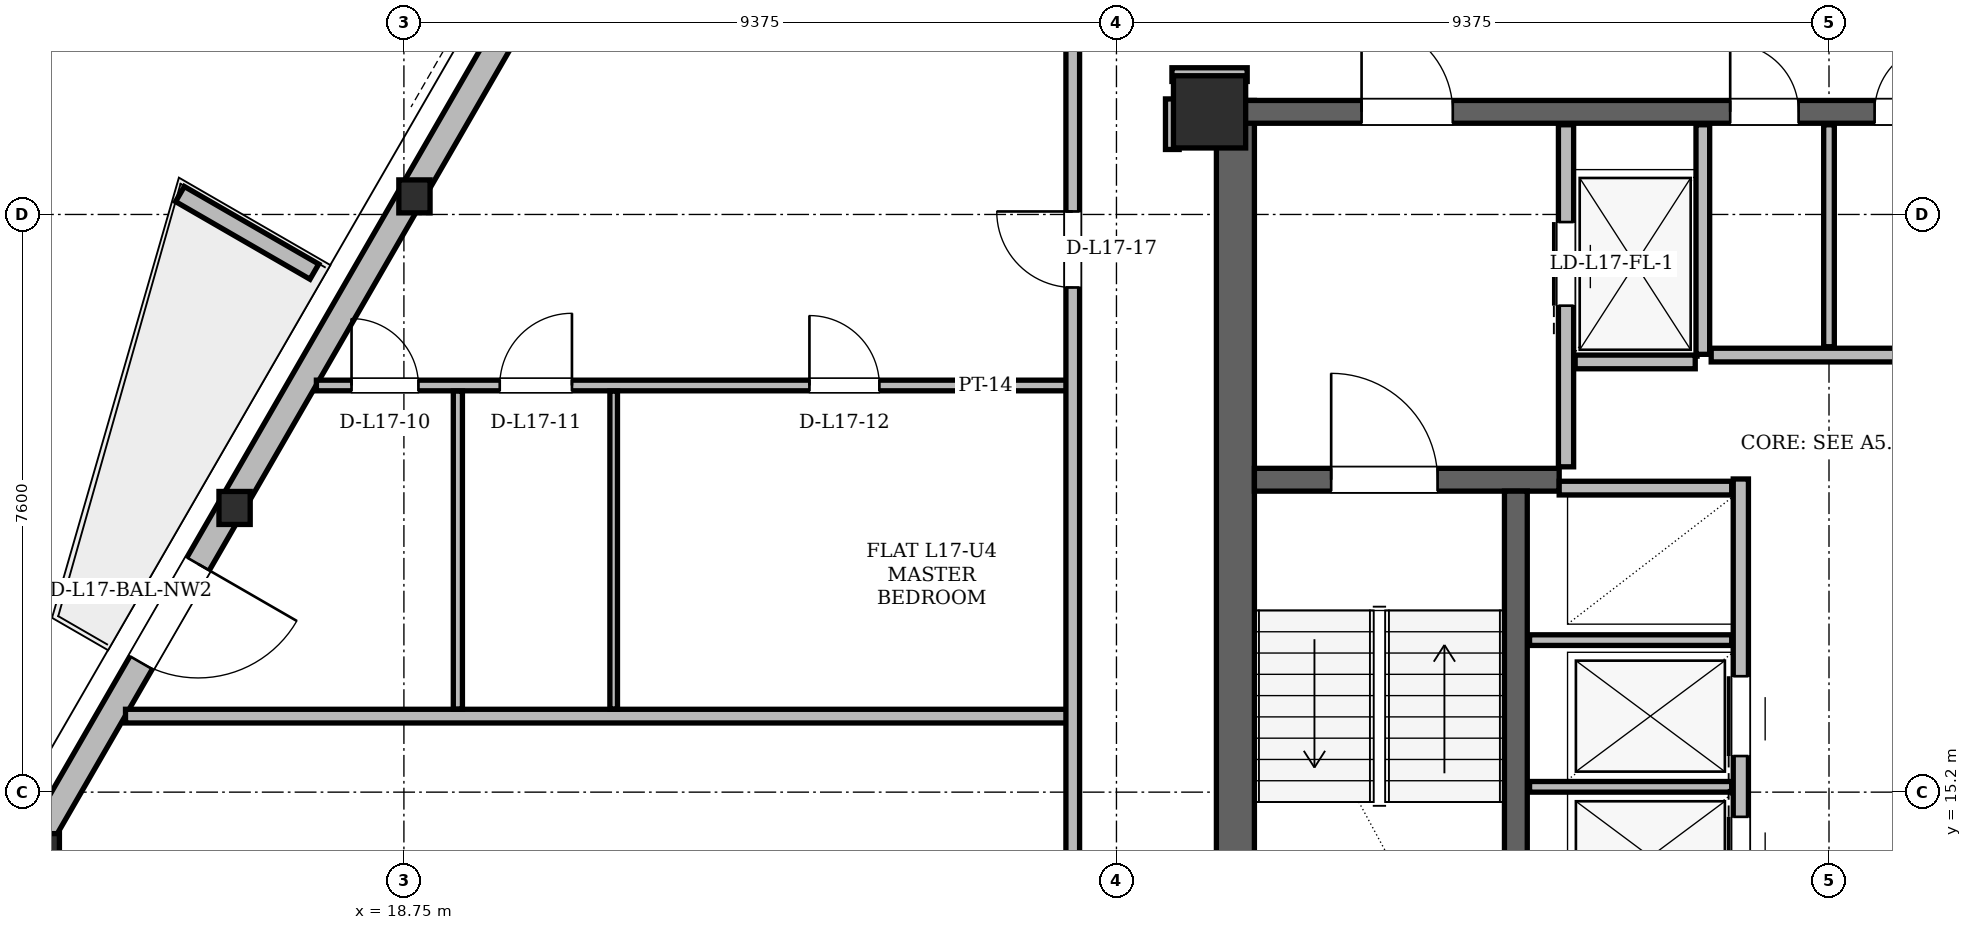
"""IFC4 building model, lengths in metres.
Left out: names, types, materials, properties, quantities, classifications, styles, units other than length and angle.
Written with IfcOpenShell. Run it as: python <this file> out.ifc"""

import sys

from ifc_helpers import new_model, si_unit, direction, frame, frame_2d, origin, origin_2d, place, context, subcontext, project, spatial, polyline, rectangle, hollow_rectangle, i_section, outline, extrude, element, fill, save


model = new_model("IFC4")
c1 = context("Model", 3, precision=1e-05, world=origin(), true_north=direction((0.0, 1.0)))
c2 = subcontext(c1, "Body", "Model", "MODEL_VIEW")
j1 = project(units=[si_unit("LENGTHUNIT", "METRE"), si_unit("PLANEANGLEUNIT", "RADIAN")], contexts=[c1])
p1 = place(None, origin())
s1 = spatial("IfcSite", under=j1, at=p1, CompositionType="ELEMENT")
p2 = place(p1, origin())
s2 = spatial("IfcBuilding", under=s1, at=p2, CompositionType="ELEMENT")
p3 = place(p2, frame((0.0, 0.0, 66.9)))
s3 = spatial("IfcBuildingStorey", under=s2, at=p3, CompositionType="ELEMENT", Elevation=66.9)
p4 = place(p3, frame((29.35, 24.15, 0.0), z_axis=(0.0, 0.0, 1.0), x_axis=(1.0, 0.0, 0.0)))
e1 = element("IfcColumn", 1, at=p4, inside=s3, PredefinedType="COLUMN", context=c2, shape_type="SweptSolid", body=[
    extrude(hollow_rectangle(XDim=0.95, YDim=0.95, WallThickness=0.08, at=origin_2d()), origin(), (0.0, 0.0, 1.0), 3.6),
])
p5 = place(p3, frame((13.788, 14.297, 0.005), z_axis=(0.016717385231, -0.023784897687, 0.999577314505), x_axis=(0.818132254309, 0.575030098743, 0.0)))
e2 = element("IfcColumn", 2, at=p5, inside=s3, PredefinedType="COLUMN", context=c2, shape_type="SweptSolid", body=[
    extrude(hollow_rectangle(XDim=0.8, YDim=0.8, WallThickness=0.065, at=origin_2d()), origin(), (0.0, 0.0, 1.0), 3.593),
])
p6 = place(p3, frame((18.852, 23.069, 0.005), z_axis=(0.020388348906, -0.017398057733, 0.999640746877), x_axis=(0.649119270697, 0.760686645348, 0.0)))
e3 = element("IfcColumn", 3, at=p6, inside=s3, PredefinedType="COLUMN", context=c2, shape_type="SweptSolid", body=[
    extrude(i_section(OverallWidth=0.411, OverallDepth=0.434, WebThickness=0.036, FlangeThickness=0.057, at=origin_2d()), origin(), (0.0, 0.0, 1.0), 3.592),
])
p7 = place(p3, frame((16.489, 18.975, 0.005), z_axis=(0.018688884401, -0.020387873892, 0.999617456929), x_axis=(0.737154140201, 0.675724628517, 0.0)))
e4 = element("IfcColumn", 4, at=p7, inside=s3, PredefinedType="COLUMN", context=c2, shape_type="SweptSolid", body=[
    extrude(i_section(OverallWidth=0.411, OverallDepth=0.434, WebThickness=0.036, FlangeThickness=0.057, at=origin_2d()), origin(), (0.0, 0.0, 1.0), 3.593),
])
p8 = place(p3, frame((29.69, 11.0, 0.0), z_axis=(0.0, 0.0, 1.0), x_axis=(0.0, 1.0, 0.0)))
e5 = element("IfcWall", 5, at=p8, inside=s3, PredefinedType="SHEAR", context=c2, shape_type="SweptSolid", body=[
    extrude(rectangle(XDim=13.3, YDim=0.5, at=frame_2d((6.65, 0.0))), origin(), (0.0, 0.0, 1.0), 3.36),
])
p9 = place(p3, frame((29.65, 24.15, 0.0), z_axis=(0.0, 0.0, 1.0), x_axis=(1.0, 0.0, 0.0)))
e6 = element("IfcWall", 6, at=p9, inside=s3, PredefinedType="SHEAR", context=c2, shape_type="SweptSolid", body=[
    extrude(rectangle(XDim=15.7, YDim=0.3, at=frame_2d((7.85, 0.0))), origin(), (0.0, 0.0, 1.0), 3.36),
])
p10 = place(p9, frame((1.7, 0.0, 0.0)))
e7 = element("IfcOpeningElement", 7, at=p10, cuts=e6, PredefinedType="OPENING", context=c2, shape_type="SweptSolid", body=[
    extrude(rectangle(XDim=1.2, YDim=2.2, at=frame_2d((0.6, 1.1))), frame((0.0, 0.15, 0.0), z_axis=(0.0, -1.0, 0.0), x_axis=(1.0, 0.0, 0.0)), (0.0, 0.0, 1.0), 0.3),
])
p11 = place(p9, frame((12.8, 0.0, 0.0)))
e8 = element("IfcOpeningElement", 8, at=p11, cuts=e6, PredefinedType="OPENING", context=c2, shape_type="SweptSolid", body=[
    extrude(rectangle(XDim=1.2, YDim=2.2, at=frame_2d((0.6, 1.1))), frame((0.0, 0.15, 0.0), z_axis=(0.0, -1.0, 0.0), x_axis=(1.0, 0.0, 0.0)), (0.0, 0.0, 1.0), 0.3),
])
p12 = place(p9, frame((6.55, 0.0, 0.0)))
e9 = element("IfcOpeningElement", 9, at=p12, cuts=e6, PredefinedType="OPENING", context=c2, shape_type="SweptSolid", body=[
    extrude(rectangle(XDim=0.9, YDim=2.05, at=frame_2d((0.45, 1.025))), frame((0.0, 0.15, 0.0), z_axis=(0.0, -1.0, 0.0), x_axis=(1.0, 0.0, 0.0)), (0.0, 0.0, 1.0), 0.3),
])
p13 = place(p9, frame((8.45, 0.0, 0.0)))
e10 = element("IfcOpeningElement", 10, at=p13, cuts=e6, PredefinedType="OPENING", context=c2, shape_type="SweptSolid", body=[
    extrude(rectangle(XDim=0.9, YDim=2.05, at=frame_2d((0.45, 1.025))), frame((0.0, 0.15, 0.0), z_axis=(0.0, -1.0, 0.0), x_axis=(1.0, 0.0, 0.0)), (0.0, 0.0, 1.0), 0.3),
])
p14 = place(p3, frame((29.94, 19.31, 0.0), z_axis=(0.0, 0.0, 1.0), x_axis=(1.0, 0.0, 0.0)))
e11 = element("IfcWall", 11, at=p14, inside=s3, PredefinedType="SHEAR", context=c2, shape_type="SweptSolid", body=[
    extrude(rectangle(XDim=4.01, YDim=0.3, at=frame_2d((2.005, 0.0))), origin(), (0.0, 0.0, 1.0), 3.36),
])
p15 = place(p14, frame((1.01, 0.0, 0.0)))
e12 = element("IfcOpeningElement", 12, at=p15, cuts=e11, PredefinedType="OPENING", context=c2, shape_type="SweptSolid", body=[
    extrude(rectangle(XDim=1.4, YDim=2.2, at=frame_2d((0.7, 1.1))), frame((0.0, 0.15, 0.0), z_axis=(0.0, -1.0, 0.0), x_axis=(1.0, 0.0, 0.0)), (0.0, 0.0, 1.0), 0.3),
])
p16 = place(p3, frame((33.38, 11.54, 0.0), z_axis=(0.0, 0.0, 1.0), x_axis=(0.0, 1.0, 0.0)))
e13 = element("IfcWall", 13, at=p16, inside=s3, PredefinedType="SHEAR", context=c2, shape_type="SweptSolid", body=[
    extrude(rectangle(XDim=7.62, YDim=0.3, at=frame_2d((3.81, 0.0))), origin(), (0.0, 0.0, 1.0), 3.36),
])
p17 = place(p3, frame((30.669, 43.537, 0.0), z_axis=(0.0, 0.0, 1.0), x_axis=(-0.499997235847, -0.866026999663, 0.0)))
e14 = element("IfcWall", 14, at=p17, inside=s3, PredefinedType="SOLIDWALL", context=c2, shape_type="SweptSolid", body=[
    extrude(rectangle(XDim=33.763, YDim=0.34, at=frame_2d((16.882, 0.0))), origin(), (0.0, 0.0, 1.0), 2.494),
])
p18 = place(p17, frame((7.924, 0.0, 0.0)))
e15 = element("IfcOpeningElement", 15, at=p18, cuts=e14, PredefinedType="OPENING", context=c2, shape_type="SweptSolid", body=[
    extrude(rectangle(XDim=1.3, YDim=2.2, at=frame_2d((0.65, 1.1))), frame((0.0, 0.17, 0.0), z_axis=(0.0, -1.0, 0.0), x_axis=(1.0, 0.0, 0.0)), (0.0, 0.0, 1.0), 0.34),
])
p19 = place(p17, frame((29.254, 0.0, 0.0)))
e16 = element("IfcOpeningElement", 16, at=p19, cuts=e14, PredefinedType="OPENING", context=c2, shape_type="SweptSolid", body=[
    extrude(rectangle(XDim=1.5, YDim=2.2, at=frame_2d((0.75, 1.1))), frame((0.0, 0.17, 0.0), z_axis=(0.0, -1.0, 0.0), x_axis=(1.0, 0.0, 0.0)), (0.0, 0.0, 1.0), 0.34),
])
p20 = place(p17, frame((12.199, 0.0, 0.85)))
e17 = element("IfcOpeningElement", 17, at=p20, cuts=e14, PredefinedType="OPENING", context=c2, shape_type="SweptSolid", body=[
    extrude(rectangle(XDim=1.8, YDim=1.534, at=frame_2d((0.9, 0.767))), frame((0.0, 0.17, 0.0), z_axis=(0.0, -1.0, 0.0), x_axis=(1.0, 0.0, 0.0)), (0.0, 0.0, 1.0), 0.34),
])
p21 = place(p17, frame((19.181, 0.0, 0.85)))
e18 = element("IfcOpeningElement", 18, at=p21, cuts=e14, PredefinedType="OPENING", context=c2, shape_type="SweptSolid", body=[
    extrude(rectangle(XDim=1.2, YDim=1.48, at=frame_2d((0.6, 0.74))), frame((0.0, 0.17, 0.0), z_axis=(0.0, -1.0, 0.0), x_axis=(1.0, 0.0, 0.0)), (0.0, 0.0, 1.0), 0.34),
])
p22 = place(p17, frame((1.231, 0.0, 0.85)))
e19 = element("IfcOpeningElement", 19, at=p22, cuts=e14, PredefinedType="OPENING", context=c2, shape_type="SweptSolid", body=[
    extrude(rectangle(XDim=1.8, YDim=1.534, at=frame_2d((0.9, 0.767))), frame((0.0, 0.17, 0.0), z_axis=(0.0, -1.0, 0.0), x_axis=(1.0, 0.0, 0.0)), (0.0, 0.0, 1.0), 0.34),
])
p23 = place(p3, frame((17.572, 22.048, 0.0), z_axis=(0.0, 0.0, 1.0), x_axis=(-0.866012356593, 0.500022597718, 0.0)))
e20 = element("IfcWall", 20, at=p23, inside=s3, PredefinedType="PARAPET", context=c2, shape_type="SweptSolid", body=[
    extrude(outline(polyline([(0.0, 0.0), (2.042, 0.0), (2.042, 1.1), (0.0, 1.32), (0.0, 0.0)])), frame((0.0, 0.115, 0.0), z_axis=(0.0, -1.0, 0.0), x_axis=(1.0, 0.0, 0.0)), (0.0, 0.0, 1.0), 0.23),
])
p24 = place(p3, frame((34.04, 19.48, 0.0), z_axis=(0.0, 0.0, 1.0), x_axis=(0.0, 1.0, 0.0)))
e21 = element("IfcWall", 21, at=p24, inside=s3, PredefinedType="PARTITIONING", context=c2, shape_type="SweptSolid", body=[
    extrude(rectangle(XDim=4.5, YDim=0.2, at=frame_2d((2.25, 0.0))), origin(), (0.0, 0.0, 1.0), 2.4),
])
p25 = place(p24, frame((2.12, 0.0, 0.0)))
e22 = element("IfcOpeningElement", 22, at=p25, cuts=e21, PredefinedType="OPENING", context=c2, shape_type="SweptSolid", body=[
    extrude(rectangle(XDim=1.1, YDim=2.2, at=frame_2d((0.55, 1.1))), frame((0.0, 0.1, 0.0), z_axis=(0.0, -1.0, 0.0), x_axis=(1.0, 0.0, 0.0)), (0.0, 0.0, 1.0), 0.2),
])
p26 = place(p3, frame((35.84, 20.96, 0.0), z_axis=(0.0, 0.0, 1.0), x_axis=(0.0, 1.0, 0.0)))
e23 = element("IfcWall", 23, at=p26, inside=s3, PredefinedType="PARTITIONING", context=c2, shape_type="SweptSolid", body=[
    extrude(rectangle(XDim=3.02, YDim=0.18, at=frame_2d((1.51, 0.0))), origin(), (0.0, 0.0, 1.0), 2.4),
])
p27 = place(p3, frame((34.16, 20.86, 0.0), z_axis=(0.0, 0.0, 1.0), x_axis=(1.0, 0.0, 0.0)))
e24 = element("IfcWall", 24, at=p27, inside=s3, PredefinedType="PARTITIONING", context=c2, shape_type="SweptSolid", body=[
    extrude(rectangle(XDim=1.58, YDim=0.18, at=frame_2d((0.79, 0.0))), origin(), (0.0, 0.0, 1.0), 3.36),
])
p28 = place(p3, frame((36.34, 11.72, 0.0), z_axis=(0.0, 0.0, 1.0), x_axis=(0.0, 1.0, 0.0)))
e25 = element("IfcWall", 25, at=p28, inside=s3, PredefinedType="PARTITIONING", context=c2, shape_type="SweptSolid", body=[
    extrude(rectangle(XDim=7.6, YDim=0.2, at=frame_2d((3.8, 0.0))), origin(), (0.0, 0.0, 1.0), 3.36),
])
p29 = place(p28, frame((0.255, 0.0, 0.0)))
e26 = element("IfcOpeningElement", 26, at=p29, cuts=e25, PredefinedType="OPENING", context=c2, shape_type="SweptSolid", body=[
    extrude(rectangle(XDim=1.05, YDim=2.15, at=frame_2d((0.525, 1.075))), frame((0.0, 0.1, 0.0), z_axis=(0.0, -1.0, 0.0), x_axis=(1.0, 0.0, 0.0)), (0.0, 0.0, 1.0), 0.2),
])
p30 = place(p28, frame((2.105, 0.0, 0.0)))
e27 = element("IfcOpeningElement", 27, at=p30, cuts=e25, PredefinedType="OPENING", context=c2, shape_type="SweptSolid", body=[
    extrude(rectangle(XDim=1.05, YDim=2.15, at=frame_2d((0.525, 1.075))), frame((0.0, 0.1, 0.0), z_axis=(0.0, -1.0, 0.0), x_axis=(1.0, 0.0, 0.0)), (0.0, 0.0, 1.0), 0.2),
])
p31 = place(p28, frame((3.955, 0.0, 0.0)))
e28 = element("IfcOpeningElement", 28, at=p31, cuts=e25, PredefinedType="OPENING", context=c2, shape_type="SweptSolid", body=[
    extrude(rectangle(XDim=1.05, YDim=2.15, at=frame_2d((0.525, 1.075))), frame((0.0, 0.1, 0.0), z_axis=(0.0, -1.0, 0.0), x_axis=(1.0, 0.0, 0.0)), (0.0, 0.0, 1.0), 0.2),
])
p32 = place(p3, frame((33.95, 19.2, 0.0), z_axis=(0.0, 0.0, 1.0), x_axis=(1.0, 0.0, 0.0)))
e29 = element("IfcWall", 29, at=p32, inside=s3, PredefinedType="PARTITIONING", context=c2, shape_type="SweptSolid", body=[
    extrude(rectangle(XDim=2.27, YDim=0.18, at=frame_2d((1.135, 0.0))), origin(), (0.0, 0.0, 1.0), 3.36),
])
for number, where, z_axis, x_axis in (
    (30, (33.56, 15.27, 0.0), (0.0, 0.0, 1.0), (1.0, 0.0, 0.0)),
    (31, (33.56, 17.2, 0.0), (0.0, 0.0, 1.0), (1.0, 0.0, 0.0)),
):
    element("IfcWall", number, at=place(p3, frame(where, z_axis=z_axis, x_axis=x_axis)), inside=s3, PredefinedType="PARTITIONING", context=c2, shape_type="SweptSolid", body=[
        extrude(rectangle(XDim=2.66, YDim=0.14, at=frame_2d((1.33, 0.0))), origin(), (0.0, 0.0, 1.0), 3.36),
    ])
p33 = place(p3, frame((35.95, 20.95, 0.0), z_axis=(0.0, 0.0, 1.0), x_axis=(1.0, 0.0, 0.0)))
e32 = element("IfcWall", 32, at=p33, inside=s3, PredefinedType="PARTITIONING", context=c2, shape_type="SweptSolid", body=[
    extrude(rectangle(XDim=3.1, YDim=0.18, at=frame_2d((1.55, 0.0))), origin(), (0.0, 0.0, 1.0), 3.36),
])
p34 = place(p3, frame((37.5, 21.06, 0.0), z_axis=(0.0, 0.0, 1.0), x_axis=(0.0, 1.0, 0.0)))
e33 = element("IfcWall", 33, at=p34, inside=s3, PredefinedType="PARTITIONING", context=c2, shape_type="SweptSolid", body=[
    extrude(rectangle(XDim=2.92, YDim=0.14, at=frame_2d((1.46, 0.0))), origin(), (0.0, 0.0, 1.0), 2.4),
])
p35 = place(p3, frame((15.087, 16.2, 0.0), z_axis=(0.0, 0.0, 1.0), x_axis=(1.0, 0.0, 0.0)))
e34 = element("IfcWall", 34, at=p35, inside=s3, PredefinedType="PARTITIONING", context=c2, shape_type="SweptSolid", body=[
    extrude(rectangle(XDim=12.463, YDim=0.18, at=frame_2d((6.231, 0.0))), origin(), (0.0, 0.0, 1.0), 2.946),
])
p36 = place(p3, frame((17.599, 20.55, 0.0), z_axis=(0.0, 0.0, 1.0), x_axis=(1.0, 0.0, 0.0)))
e35 = element("IfcWall", 35, at=p36, inside=s3, PredefinedType="PARTITIONING", context=c2, shape_type="SweptSolid", body=[
    extrude(rectangle(XDim=10.001, YDim=0.14, at=frame_2d((5.001, 0.0))), origin(), (0.0, 0.0, 1.0), 3.36),
])
p37 = place(p36, frame((0.462, 0.0, 0.0)))
e36 = element("IfcOpeningElement", 36, at=p37, cuts=e35, PredefinedType="OPENING", context=c2, shape_type="SweptSolid", body=[
    extrude(rectangle(XDim=0.88, YDim=2.08, at=frame_2d((0.44, 1.04))), frame((0.0, 0.07, 0.0), z_axis=(0.0, -1.0, 0.0), x_axis=(1.0, 0.0, 0.0)), (0.0, 0.0, 1.0), 0.14),
])
p38 = place(p36, frame((2.412, 0.0, 0.0)))
e37 = element("IfcOpeningElement", 37, at=p38, cuts=e35, PredefinedType="OPENING", context=c2, shape_type="SweptSolid", body=[
    extrude(rectangle(XDim=0.95, YDim=2.1, at=frame_2d((0.475, 1.05))), frame((0.0, 0.07, 0.0), z_axis=(0.0, -1.0, 0.0), x_axis=(1.0, 0.0, 0.0)), (0.0, 0.0, 1.0), 0.14),
])
p39 = place(p36, frame((6.487, 0.0, 0.0)))
e38 = element("IfcOpeningElement", 38, at=p39, cuts=e35, PredefinedType="OPENING", context=c2, shape_type="SweptSolid", body=[
    extrude(rectangle(XDim=0.92, YDim=2.12, at=frame_2d((0.46, 1.06))), frame((0.0, 0.07, 0.0), z_axis=(0.0, -1.0, 0.0), x_axis=(1.0, 0.0, 0.0)), (0.0, 0.0, 1.0), 0.14),
])
p40 = place(p3, frame((28.855, 24.64, 0.0), z_axis=(0.0, 0.0, 1.0), x_axis=(1.0, 0.0, 0.0)))
e39 = element("IfcWall", 39, at=p40, inside=s3, PredefinedType="PARTITIONING", context=c2, shape_type="SweptSolid", body=[
    extrude(rectangle(XDim=0.99, YDim=0.18, at=frame_2d((0.495, 0.0))), origin(), (0.0, 0.0, 1.0), 2.738),
])
p41 = place(p3, frame((19.46, 16.294, 0.0), z_axis=(0.0, 0.0, 1.0), x_axis=(0.0, 1.0, 0.0)))
e40 = element("IfcWall", 40, at=p41, inside=s3, PredefinedType="PARTITIONING", context=c2, shape_type="SweptSolid", body=[
    extrude(rectangle(XDim=4.182, YDim=0.12, at=frame_2d((2.091, 0.0))), origin(), (0.0, 0.0, 1.0), 2.946),
])
p42 = place(p3, frame((21.51, 16.294, 0.0), z_axis=(0.0, 0.0, 1.0), x_axis=(0.0, 1.0, 0.0)))
e41 = element("IfcWall", 41, at=p42, inside=s3, PredefinedType="PARTITIONING", context=c2, shape_type="SweptSolid", body=[
    extrude(rectangle(XDim=4.182, YDim=0.1, at=frame_2d((2.091, 0.0))), origin(), (0.0, 0.0, 1.0), 3.36),
])
p43 = place(p3, frame((27.55, 11.044, 0.0), z_axis=(0.0, 0.0, 1.0), x_axis=(0.0, 1.0, 0.0)))
e42 = element("IfcWall", 42, at=p43, inside=s3, PredefinedType="PARTITIONING", context=c2, shape_type="SweptSolid", body=[
    extrude(rectangle(XDim=26.742, YDim=0.18, at=frame_2d((13.371, 0.0))), origin(), (0.0, 0.0, 1.0), 2.494),
])
p44 = place(p43, frame((10.795, 0.0, 0.0)))
e43 = element("IfcOpeningElement", 43, at=p44, cuts=e42, PredefinedType="OPENING", context=c2, shape_type="SweptSolid", body=[
    extrude(rectangle(XDim=1.0, YDim=2.18, at=frame_2d((0.5, 1.09))), frame((0.0, 0.09, 0.0), z_axis=(0.0, -1.0, 0.0), x_axis=(1.0, 0.0, 0.0)), (0.0, 0.0, 1.0), 0.18),
])
p45 = place(p3, frame((28.86, 23.655, 0.0), z_axis=(0.0, 0.0, 1.0), x_axis=(0.0, 1.0, 0.0)))
e44 = element("IfcWall", 44, at=p45, inside=s3, PredefinedType="PARTITIONING", context=c2, shape_type="SweptSolid", body=[
    extrude(rectangle(XDim=0.665, YDim=0.18, at=frame_2d((0.333, 0.0))), origin(), (0.0, 0.0, 1.0), 2.946),
])
p46 = place(p19, origin())
e45 = element("IfcDoor", 45, at=p46, inside=s3, OperationType="SINGLE_SWING_LEFT", PredefinedType="DOOR", context=c2, shape_type="SweptSolid", body=[
    extrude(rectangle(XDim=1.5, YDim=2.2, at=frame_2d((0.75, 1.1))), frame((0.0, 0.025, 0.0), z_axis=(0.0, -1.0, 0.0), x_axis=(1.0, 0.0, 0.0)), (0.0, 0.0, 1.0), 0.05),
])
fill(e16, e45)
p47 = place(p25, origin())
e46 = element("IfcDoor", 46, at=p47, inside=s3, OperationType="SLIDING_TO_LEFT", PredefinedType="DOOR", context=c2, shape_type="SweptSolid", body=[
    extrude(rectangle(XDim=1.1, YDim=2.2, at=frame_2d((0.55, 1.1))), frame((0.0, 0.025, 0.0), z_axis=(0.0, -1.0, 0.0), x_axis=(1.0, 0.0, 0.0)), (0.0, 0.0, 1.0), 0.05),
])
fill(e22, e46)
p48 = place(p30, origin())
e47 = element("IfcDoor", 47, at=p48, inside=s3, OperationType="SLIDING_TO_RIGHT", PredefinedType="DOOR", context=c2, shape_type="SweptSolid", body=[
    extrude(rectangle(XDim=1.05, YDim=2.15, at=frame_2d((0.525, 1.075))), frame((0.0, 0.025, 0.0), z_axis=(0.0, -1.0, 0.0), x_axis=(1.0, 0.0, 0.0)), (0.0, 0.0, 1.0), 0.05),
])
fill(e27, e47)
p49 = place(p31, origin())
e48 = element("IfcDoor", 48, at=p49, inside=s3, OperationType="SLIDING_TO_LEFT", PredefinedType="DOOR", context=c2, shape_type="SweptSolid", body=[
    extrude(rectangle(XDim=1.05, YDim=2.15, at=frame_2d((0.525, 1.075))), frame((0.0, 0.025, 0.0), z_axis=(0.0, -1.0, 0.0), x_axis=(1.0, 0.0, 0.0)), (0.0, 0.0, 1.0), 0.05),
])
fill(e28, e48)
p50 = place(p15, origin())
e49 = element("IfcDoor", 49, at=p50, inside=s3, OperationType="SINGLE_SWING_LEFT", PredefinedType="DOOR", context=c2, shape_type="SweptSolid", body=[
    extrude(rectangle(XDim=1.4, YDim=2.2, at=frame_2d((0.7, 1.1))), frame((0.0, 0.025, 0.0), z_axis=(0.0, -1.0, 0.0), x_axis=(1.0, 0.0, 0.0)), (0.0, 0.0, 1.0), 0.05),
])
fill(e12, e49)
p51 = place(p10, origin())
e50 = element("IfcDoor", 50, at=p51, inside=s3, OperationType="SINGLE_SWING_LEFT", PredefinedType="DOOR", context=c2, shape_type="SweptSolid", body=[
    extrude(rectangle(XDim=1.2, YDim=2.2, at=frame_2d((0.6, 1.1))), frame((0.0, 0.025, 0.0), z_axis=(0.0, -1.0, 0.0), x_axis=(1.0, 0.0, 0.0)), (0.0, 0.0, 1.0), 0.05),
])
fill(e7, e50)
p52 = place(p12, origin())
e51 = element("IfcDoor", 51, at=p52, inside=s3, OperationType="SINGLE_SWING_LEFT", PredefinedType="DOOR", context=c2, shape_type="SweptSolid", body=[
    extrude(rectangle(XDim=0.9, YDim=2.05, at=frame_2d((0.45, 1.025))), frame((0.0, 0.025, 0.0), z_axis=(0.0, -1.0, 0.0), x_axis=(1.0, 0.0, 0.0)), (0.0, 0.0, 1.0), 0.05),
])
fill(e9, e51)
p53 = place(p13, origin())
e52 = element("IfcDoor", 52, at=p53, inside=s3, OperationType="SINGLE_SWING_RIGHT", PredefinedType="DOOR", context=c2, shape_type="SweptSolid", body=[
    extrude(rectangle(XDim=0.9, YDim=2.05, at=frame_2d((0.45, 1.025))), frame((0.0, 0.025, 0.0), z_axis=(0.0, -1.0, 0.0), x_axis=(1.0, 0.0, 0.0)), (0.0, 0.0, 1.0), 0.05),
])
fill(e10, e52)
p54 = place(p37, origin())
e53 = element("IfcDoor", 53, at=p54, inside=s3, OperationType="SINGLE_SWING_LEFT", PredefinedType="DOOR", context=c2, shape_type="SweptSolid", body=[
    extrude(rectangle(XDim=0.88, YDim=2.08, at=frame_2d((0.44, 1.04))), frame((0.0, 0.025, 0.0), z_axis=(0.0, -1.0, 0.0), x_axis=(1.0, 0.0, 0.0)), (0.0, 0.0, 1.0), 0.05),
])
fill(e36, e53)
p55 = place(p38, origin())
e54 = element("IfcDoor", 54, at=p55, inside=s3, OperationType="SINGLE_SWING_RIGHT", PredefinedType="DOOR", context=c2, shape_type="SweptSolid", body=[
    extrude(rectangle(XDim=0.95, YDim=2.1, at=frame_2d((0.475, 1.05))), frame((0.0, 0.025, 0.0), z_axis=(0.0, -1.0, 0.0), x_axis=(1.0, 0.0, 0.0)), (0.0, 0.0, 1.0), 0.05),
])
fill(e37, e54)
p56 = place(p39, origin())
e55 = element("IfcDoor", 55, at=p56, inside=s3, OperationType="SINGLE_SWING_LEFT", PredefinedType="DOOR", context=c2, shape_type="SweptSolid", body=[
    extrude(rectangle(XDim=0.92, YDim=2.12, at=frame_2d((0.46, 1.06))), frame((0.0, 0.025, 0.0), z_axis=(0.0, -1.0, 0.0), x_axis=(1.0, 0.0, 0.0)), (0.0, 0.0, 1.0), 0.05),
])
fill(e38, e55)
p57 = place(p44, origin())
e56 = element("IfcDoor", 56, at=p57, inside=s3, OperationType="SINGLE_SWING_RIGHT", PredefinedType="DOOR", context=c2, shape_type="SweptSolid", body=[
    extrude(rectangle(XDim=1.0, YDim=2.18, at=frame_2d((0.5, 1.09))), frame((0.0, 0.025, 0.0), z_axis=(0.0, -1.0, 0.0), x_axis=(1.0, 0.0, 0.0)), (0.0, 0.0, 1.0), 0.05),
])
fill(e43, e56)
save(model, sys.argv[1])
